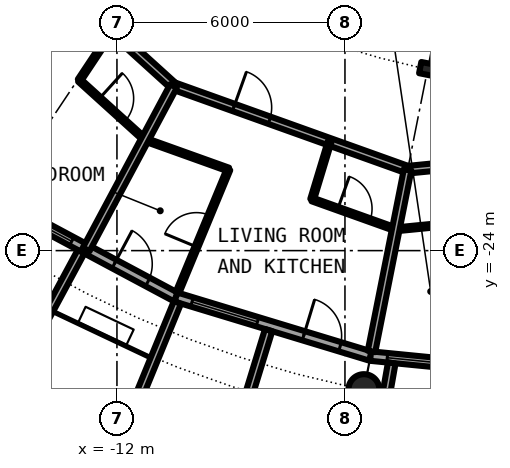
"""IFC4 building model, lengths in metres.
Left out: names, types, materials, properties, quantities, classifications, styles, units other than length and angle.
Written with IfcOpenShell. Run it as: python <this file> out.ifc"""

import sys

from ifc_helpers import new_model, si_unit, direction, frame, frame_2d, origin, origin_2d, place, context, subcontext, project, spatial, rectangle, hollow_circle, i_section, extrude, element, fill, save


model = new_model("IFC4")
c1 = context("Model", 3, precision=1e-05, world=origin(), true_north=direction((0.0, 1.0)))
c2 = subcontext(c1, "Body", "Model", "MODEL_VIEW")
j1 = project(units=[si_unit("LENGTHUNIT", "METRE"), si_unit("PLANEANGLEUNIT", "RADIAN")], contexts=[c1])
p1 = place(None, origin())
s1 = spatial("IfcSite", under=j1, at=p1, CompositionType="ELEMENT")
p2 = place(p1, origin())
s2 = spatial("IfcBuilding", under=s1, at=p2, CompositionType="ELEMENT")
p3 = place(p2, frame((0.0, 0.0, 202.4)))
s3 = spatial("IfcBuildingStorey", under=s2, at=p3, CompositionType="ELEMENT", Elevation=202.4)
p4 = place(p3, frame((-5.501, -27.658, 0.0), z_axis=(0.0, 0.0, 1.0), x_axis=(1.0, 0.0, 0.0)))
e1 = element("IfcColumn", 1, at=p4, inside=s3, PredefinedType="COLUMN", context=c2, shape_type="SweptSolid", body=[
    extrude(hollow_circle(Radius=0.406, WallThickness=0.03, at=origin_2d()), origin(), (0.0, 0.0, 1.0), 3.05),
])
p5 = place(p3, frame((-3.824, -19.223, 0.0), z_axis=(0.0, 0.0, 1.0), x_axis=(-0.195090322016, -0.980785280403, 0.0)))
e2 = element("IfcColumn", 2, at=p5, inside=s3, PredefinedType="COLUMN", context=c2, shape_type="SweptSolid", body=[
    extrude(i_section(OverallWidth=0.3, OverallDepth=0.4, WebThickness=0.013, FlangeThickness=0.024, FilletRadius=0.027, at=origin_2d()), origin(), (0.0, 0.0, 1.0), 3.05),
])
p6 = place(p3, frame((-15.167, -22.699, 0.0), z_axis=(0.0, 0.0, 1.0), x_axis=(0.881915646801, -0.471407246368, 0.0)))
e3 = element("IfcWall", 3, at=p6, inside=s3, PredefinedType="SOLIDWALL", context=c2, shape_type="SweptSolid", body=[
    extrude(rectangle(XDim=5.352, YDim=0.25, at=frame_2d((2.676, 0.0))), origin(), (0.0, 0.0, 1.0), 2.7),
])
p7 = place(p6, frame((0.441, 0.0, 0.3)))
e4 = element("IfcOpeningElement", 4, at=p7, cuts=e3, PredefinedType="OPENING", context=c2, shape_type="SweptSolid", body=[
    extrude(rectangle(XDim=1.8, YDim=2.1, at=frame_2d((0.9, 1.05))), frame((0.0, 0.135, 0.0), z_axis=(0.0, -1.0, 0.0), x_axis=(1.0, 0.0, 0.0)), (0.0, 0.0, 1.0), 0.27),
])
p8 = place(p6, frame((3.51, 0.0, 0.0)))
e5 = element("IfcOpeningElement", 5, at=p8, cuts=e3, PredefinedType="OPENING", context=c2, shape_type="SweptSolid", body=[
    extrude(rectangle(XDim=1.0, YDim=2.2, at=frame_2d((0.5, 1.1))), frame((0.0, 0.135, 0.0), z_axis=(0.0, -1.0, 0.0), x_axis=(1.0, 0.0, 0.0)), (0.0, 0.0, 1.0), 0.27),
])
p9 = place(p3, frame((-12.945, -24.029, -0.03), z_axis=(0.0, 0.0, 1.0), x_axis=(-0.474424310775, -0.88029629861, 0.0)))
e6 = element("IfcWall", 6, at=p9, inside=s3, PredefinedType="SOLIDWALL", context=c2, shape_type="SweptSolid", body=[
    extrude(rectangle(XDim=3.006, YDim=0.2, at=frame_2d((1.503, 0.0))), origin(), (0.0, 0.0, 1.0), 2.73),
])
p10 = place(p3, frame((-10.447, -25.222, 0.0), z_axis=(0.0, 0.0, 1.0), x_axis=(0.956965678721, -0.290201119486, 0.0)))
e7 = element("IfcWall", 7, at=p10, inside=s3, PredefinedType="SOLIDWALL", context=c2, shape_type="SweptSolid", body=[
    extrude(rectangle(XDim=5.351, YDim=0.25, at=frame_2d((2.676, 0.0))), origin(), (0.0, 0.0, 1.0), 2.7),
])
p11 = place(p10, frame((0.441, 0.0, 0.3)))
e8 = element("IfcOpeningElement", 8, at=p11, cuts=e7, PredefinedType="OPENING", context=c2, shape_type="SweptSolid", body=[
    extrude(rectangle(XDim=1.8, YDim=2.1, at=frame_2d((0.9, 1.05))), frame((0.0, 0.135, 0.0), z_axis=(0.0, -1.0, 0.0), x_axis=(1.0, 0.0, 0.0)), (0.0, 0.0, 1.0), 0.27),
])
p12 = place(p10, frame((3.51, 0.0, 0.0)))
e9 = element("IfcOpeningElement", 9, at=p12, cuts=e7, PredefinedType="OPENING", context=c2, shape_type="SweptSolid", body=[
    extrude(rectangle(XDim=1.0, YDim=2.2, at=frame_2d((0.5, 1.1))), frame((0.0, 0.135, 0.0), z_axis=(0.0, -1.0, 0.0), x_axis=(1.0, 0.0, 0.0)), (0.0, 0.0, 1.0), 0.27),
])
p13 = place(p3, frame((-10.409, -25.364, -0.03), z_axis=(0.0, 0.0, 1.0), x_axis=(-0.379509886562, -0.925187681501, 0.0)))
e10 = element("IfcWall", 10, at=p13, inside=s3, PredefinedType="SOLIDWALL", context=c2, shape_type="SweptSolid", body=[
    extrude(rectangle(XDim=2.883, YDim=0.2, at=frame_2d((1.441, 0.0))), origin(), (0.0, 0.0, 1.0), 2.73),
])
p14 = place(p3, frame((-8.009, -26.092, -0.03), z_axis=(0.0, 0.0, 1.0), x_axis=(-0.293406695073, -0.955987715029, 0.0)))
e11 = element("IfcWall", 11, at=p14, inside=s3, PredefinedType="SOLIDWALL", context=c2, shape_type="SweptSolid", body=[
    extrude(rectangle(XDim=3.006, YDim=0.2, at=frame_2d((1.503, 0.0))), origin(), (0.0, 0.0, 1.0), 2.73),
])
p15 = place(p3, frame((-5.326, -26.775, 0.0), z_axis=(0.0, 0.0, 1.0), x_axis=(0.995173996315, -0.098126026407, 0.0)))
e12 = element("IfcWall", 12, at=p15, inside=s3, PredefinedType="SOLIDWALL", context=c2, shape_type="SweptSolid", body=[
    extrude(rectangle(XDim=5.352, YDim=0.25, at=frame_2d((2.676, 0.0))), origin(), (0.0, 0.0, 1.0), 2.7),
])
p16 = place(p15, frame((0.441, 0.0, 0.3)))
e13 = element("IfcOpeningElement", 13, at=p16, cuts=e12, PredefinedType="OPENING", context=c2, shape_type="SweptSolid", body=[
    extrude(rectangle(XDim=1.8, YDim=2.1, at=frame_2d((0.9, 1.05))), frame((0.0, 0.135, 0.0), z_axis=(0.0, -1.0, 0.0), x_axis=(1.0, 0.0, 0.0)), (0.0, 0.0, 1.0), 0.27),
])
p17 = place(p15, frame((3.51, 0.0, 0.0)))
e14 = element("IfcOpeningElement", 14, at=p17, cuts=e12, PredefinedType="OPENING", context=c2, shape_type="SweptSolid", body=[
    extrude(rectangle(XDim=1.0, YDim=2.2, at=frame_2d((0.5, 1.1))), frame((0.0, 0.135, 0.0), z_axis=(0.0, -1.0, 0.0), x_axis=(1.0, 0.0, 0.0)), (0.0, 0.0, 1.0), 0.27),
])
p18 = place(p3, frame((-4.769, -26.956, -0.03), z_axis=(0.0, 0.0, 1.0), x_axis=(-0.174056778901, -0.984735618183, 0.0)))
e15 = element("IfcWall", 15, at=p18, inside=s3, PredefinedType="SOLIDWALL", context=c2, shape_type="SweptSolid", body=[
    extrude(rectangle(XDim=2.925, YDim=0.2, at=frame_2d((1.462, 0.0))), origin(), (0.0, 0.0, 1.0), 2.73),
])
p19 = place(p3, frame((-11.266, -21.078, 0.0), z_axis=(0.0, 0.0, 1.0), x_axis=(0.941477019106, -0.337077175873, 0.0)))
e16 = element("IfcWall", 16, at=p19, inside=s3, PredefinedType="PARTITIONING", context=c2, shape_type="SweptSolid", body=[
    extrude(rectangle(XDim=2.338, YDim=0.1, at=frame_2d((1.169, 0.0))), origin(), (0.0, 0.0, 1.0), 2.7),
])
p20 = place(p3, frame((-6.864, -22.654, 0.0), z_axis=(0.0, 0.0, 1.0), x_axis=(0.941498294089, -0.337017747646, 0.0)))
e17 = element("IfcWall", 17, at=p20, inside=s3, PredefinedType="PARTITIONING", context=c2, shape_type="SweptSolid", body=[
    extrude(rectangle(XDim=2.338, YDim=0.1, at=frame_2d((1.169, 0.0))), origin(), (0.0, 0.0, 1.0), 2.7),
])
p21 = place(p20, frame((0.719, 0.0, 0.0)))
e18 = element("IfcOpeningElement", 18, at=p21, cuts=e17, PredefinedType="OPENING", context=c2, shape_type="SweptSolid", body=[
    extrude(rectangle(XDim=0.9, YDim=2.3, at=frame_2d((0.45, 1.15))), frame((0.0, 0.06, 0.0), z_axis=(0.0, -1.0, 0.0), x_axis=(1.0, 0.0, 0.0)), (0.0, 0.0, 1.0), 0.12),
])
p22 = place(p3, frame((-12.988, -19.518, 0.0), z_axis=(0.0, 0.0, 1.0), x_axis=(0.741132356378, -0.671358942988, 0.0)))
e19 = element("IfcWall", 19, at=p22, inside=s3, PredefinedType="PARTITIONING", context=c2, shape_type="SweptSolid", body=[
    extrude(rectangle(XDim=2.323, YDim=0.1, at=frame_2d((1.162, 0.0))), origin(), (0.0, 0.0, 1.0), 2.7),
])
p23 = place(p22, frame((0.712, 0.0, 0.0)))
e20 = element("IfcOpeningElement", 20, at=p23, cuts=e19, PredefinedType="OPENING", context=c2, shape_type="SweptSolid", body=[
    extrude(rectangle(XDim=0.9, YDim=2.3, at=frame_2d((0.45, 1.15))), frame((0.0, 0.06, 0.0), z_axis=(0.0, -1.0, 0.0), x_axis=(1.0, 0.0, 0.0)), (0.0, 0.0, 1.0), 0.12),
])
p24 = place(p3, frame((-4.667, -23.441, 0.0), z_axis=(0.0, 0.0, 1.0), x_axis=(0.995185674562, 0.098007515761, 0.0)))
e21 = element("IfcWall", 21, at=p24, inside=s3, PredefinedType="PARTITIONING", context=c2, shape_type="SweptSolid", body=[
    extrude(rectangle(XDim=6.948, YDim=0.1, at=frame_2d((3.474, 0.0))), origin(), (0.0, 0.0, 1.0), 2.7),
])
p25 = place(p24, frame((3.021, 0.0, 0.0)))
e22 = element("IfcOpeningElement", 22, at=p25, cuts=e21, PredefinedType="OPENING", context=c2, shape_type="SweptSolid", body=[
    extrude(rectangle(XDim=0.9, YDim=2.3, at=frame_2d((0.45, 1.15))), frame((0.0, 0.06, 0.0), z_axis=(0.0, -1.0, 0.0), x_axis=(1.0, 0.0, 0.0)), (0.0, 0.0, 1.0), 0.12),
])
p26 = place(p3, frame((-10.512, -19.667, 0.0), z_axis=(0.0, 0.0, 1.0), x_axis=(0.941518972512, -0.336959974478, 0.0)))
e23 = element("IfcWall", 23, at=p26, inside=s3, PredefinedType="PARTITIONING", context=c2, shape_type="SweptSolid", body=[
    extrude(rectangle(XDim=6.547, YDim=0.2, at=frame_2d((3.273, 0.0))), origin(), (0.0, 0.0, 1.0), 2.7),
])
p27 = place(p26, frame((1.682, 0.0, 0.0)))
e24 = element("IfcOpeningElement", 24, at=p27, cuts=e23, PredefinedType="OPENING", context=c2, shape_type="SweptSolid", body=[
    extrude(rectangle(XDim=1.0, YDim=2.3, at=frame_2d((0.5, 1.15))), frame((0.0, 0.11, 0.0), z_axis=(0.0, -1.0, 0.0), x_axis=(1.0, 0.0, 0.0)), (0.0, 0.0, 1.0), 0.22),
])
p28 = place(p3, frame((-18.542, -12.389, 0.0), z_axis=(0.0, 0.0, 1.0), x_axis=(0.74093897184, -0.671572363941, 0.0)))
e25 = element("IfcWall", 25, at=p28, inside=s3, PredefinedType="PARTITIONING", context=c2, shape_type="SweptSolid", body=[
    extrude(rectangle(XDim=10.84, YDim=0.2, at=frame_2d((5.42, 0.0))), origin(), (0.0, 0.0, 1.0), 2.7),
])
p29 = place(p28, frame((6.544, 0.0, 0.0)))
e26 = element("IfcOpeningElement", 26, at=p29, cuts=e25, PredefinedType="OPENING", context=c2, shape_type="SweptSolid", body=[
    extrude(rectangle(XDim=1.0, YDim=2.3, at=frame_2d((0.5, 1.15))), frame((0.0, 0.11, 0.0), z_axis=(0.0, -1.0, 0.0), x_axis=(1.0, 0.0, 0.0)), (0.0, 0.0, 1.0), 0.22),
])
p30 = place(p3, frame((-4.355, -21.872, 0.0), z_axis=(0.0, 0.0, 1.0), x_axis=(0.995184945277, 0.098014920772, 0.0)))
e27 = element("IfcWall", 27, at=p30, inside=s3, PredefinedType="PARTITIONING", context=c2, shape_type="SweptSolid", body=[
    extrude(rectangle(XDim=12.958, YDim=0.2, at=frame_2d((6.479, 0.0))), origin(), (0.0, 0.0, 1.0), 2.7),
])
p31 = place(p30, frame((5.978, 0.0, 0.0)))
e28 = element("IfcOpeningElement", 28, at=p31, cuts=e27, PredefinedType="OPENING", context=c2, shape_type="SweptSolid", body=[
    extrude(rectangle(XDim=1.0, YDim=2.3, at=frame_2d((0.5, 1.15))), frame((0.0, 0.11, 0.0), z_axis=(0.0, -1.0, 0.0), x_axis=(1.0, 0.0, 0.0)), (0.0, 0.0, 1.0), 0.22),
])
p32 = place(p3, frame((-6.864, -22.653, 0.0), z_axis=(0.0, 0.0, 1.0), x_axis=(0.290315311421, 0.956931042424, 0.0)))
e29 = element("IfcWall", 29, at=p32, inside=s3, PredefinedType="PARTITIONING", context=c2, shape_type="SweptSolid", body=[
    extrude(rectangle(XDim=1.584, YDim=0.1, at=frame_2d((0.792, 0.0))), origin(), (0.0, 0.0, 1.0), 2.7),
])
p33 = place(p3, frame((-12.988, -19.518, 0.0), z_axis=(0.0, 0.0, 1.0), x_axis=(0.554125989098, 0.832432813028, 0.0)))
e30 = element("IfcWall", 30, at=p33, inside=s3, PredefinedType="PARTITIONING", context=c2, shape_type="SweptSolid", body=[
    extrude(rectangle(XDim=1.57, YDim=0.1, at=frame_2d((0.785, 0.0))), origin(), (0.0, 0.0, 1.0), 2.7),
])
p34 = place(p3, frame((-12.809, -23.967, 0.0), z_axis=(0.0, 0.0, 1.0), x_axis=(0.471427642527, 0.881904744211, 0.0)))
e31 = element("IfcWall", 31, at=p34, inside=s3, PredefinedType="PARTITIONING", context=c2, shape_type="SweptSolid", body=[
    extrude(rectangle(XDim=4.875, YDim=0.2, at=frame_2d((2.438, 0.0))), origin(), (0.0, 0.0, 1.0), 2.7),
])
p35 = place(p3, frame((-10.407, -25.103, 0.0), z_axis=(0.0, 0.0, 1.0), x_axis=(0.382977322646, 0.9237577444, 0.0)))
e32 = element("IfcWall", 32, at=p35, inside=s3, PredefinedType="PARTITIONING", context=c2, shape_type="SweptSolid", body=[
    extrude(rectangle(XDim=3.504, YDim=0.1, at=frame_2d((1.752, 0.0))), origin(), (0.0, 0.0, 1.0), 2.7),
])
p36 = place(p35, frame((1.302, 0.0, 0.0)))
e33 = element("IfcOpeningElement", 33, at=p36, cuts=e32, PredefinedType="OPENING", context=c2, shape_type="SweptSolid", body=[
    extrude(rectangle(XDim=0.9, YDim=2.3, at=frame_2d((0.45, 1.15))), frame((0.0, 0.06, 0.0), z_axis=(0.0, -1.0, 0.0), x_axis=(1.0, 0.0, 0.0)), (0.0, 0.0, 1.0), 0.12),
])
p37 = place(p3, frame((-5.302, -26.653, 0.0), z_axis=(0.0, 0.0, 1.0), x_axis=(0.195075825861, 0.980788163756, 0.0)))
e34 = element("IfcWall", 34, at=p37, inside=s3, PredefinedType="PARTITIONING", context=c2, shape_type="SweptSolid", body=[
    extrude(rectangle(XDim=4.875, YDim=0.2, at=frame_2d((2.438, 0.0))), origin(), (0.0, 0.0, 1.0), 2.7),
])
p38 = place(p7, origin())
e35 = element("IfcWindow", 35, at=p38, inside=s3, PartitioningType="SINGLE_PANEL", PredefinedType="WINDOW", context=c2, shape_type="SweptSolid", body=[
    extrude(rectangle(XDim=1.8, YDim=2.1, at=frame_2d((0.9, 1.05))), frame((0.0, 0.03, 0.0), z_axis=(0.0, -1.0, 0.0), x_axis=(1.0, 0.0, 0.0)), (0.0, 0.0, 1.0), 0.06),
])
fill(e4, e35)
p39 = place(p8, origin())
e36 = element("IfcDoor", 36, at=p39, inside=s3, OperationType="SINGLE_SWING_LEFT", PredefinedType="DOOR", context=c2, shape_type="SweptSolid", body=[
    extrude(rectangle(XDim=1.0, YDim=2.2, at=frame_2d((0.5, 1.1))), frame((0.0, 0.025, 0.0), z_axis=(0.0, -1.0, 0.0), x_axis=(1.0, 0.0, 0.0)), (0.0, 0.0, 1.0), 0.05),
])
fill(e5, e36)
p40 = place(p11, origin())
e37 = element("IfcWindow", 37, at=p40, inside=s3, PartitioningType="SINGLE_PANEL", PredefinedType="WINDOW", context=c2, shape_type="SweptSolid", body=[
    extrude(rectangle(XDim=1.8, YDim=2.1, at=frame_2d((0.9, 1.05))), frame((0.0, 0.03, 0.0), z_axis=(0.0, -1.0, 0.0), x_axis=(1.0, 0.0, 0.0)), (0.0, 0.0, 1.0), 0.06),
])
fill(e8, e37)
p41 = place(p12, origin())
e38 = element("IfcDoor", 38, at=p41, inside=s3, OperationType="SINGLE_SWING_LEFT", PredefinedType="DOOR", context=c2, shape_type="SweptSolid", body=[
    extrude(rectangle(XDim=1.0, YDim=2.2, at=frame_2d((0.5, 1.1))), frame((0.0, 0.025, 0.0), z_axis=(0.0, -1.0, 0.0), x_axis=(1.0, 0.0, 0.0)), (0.0, 0.0, 1.0), 0.05),
])
fill(e9, e38)
p42 = place(p16, origin())
e39 = element("IfcWindow", 39, at=p42, inside=s3, PartitioningType="SINGLE_PANEL", PredefinedType="WINDOW", context=c2, shape_type="SweptSolid", body=[
    extrude(rectangle(XDim=1.8, YDim=2.1, at=frame_2d((0.9, 1.05))), frame((0.0, 0.03, 0.0), z_axis=(0.0, -1.0, 0.0), x_axis=(1.0, 0.0, 0.0)), (0.0, 0.0, 1.0), 0.06),
])
fill(e13, e39)
p43 = place(p23, origin())
e40 = element("IfcDoor", 40, at=p43, inside=s3, OperationType="SINGLE_SWING_RIGHT", PredefinedType="DOOR", context=c2, shape_type="SweptSolid", body=[
    extrude(rectangle(XDim=0.9, YDim=2.3, at=frame_2d((0.45, 1.15))), frame((0.0, 0.025, 0.0), z_axis=(0.0, -1.0, 0.0), x_axis=(1.0, 0.0, 0.0)), (0.0, 0.0, 1.0), 0.05),
])
fill(e20, e40)
p44 = place(p27, origin())
e41 = element("IfcDoor", 41, at=p44, inside=s3, OperationType="SINGLE_SWING_LEFT", PredefinedType="DOOR", context=c2, shape_type="SweptSolid", body=[
    extrude(rectangle(XDim=1.0, YDim=2.3, at=frame_2d((0.5, 1.15))), frame((0.0, 0.025, 0.0), z_axis=(0.0, -1.0, 0.0), x_axis=(1.0, 0.0, 0.0)), (0.0, 0.0, 1.0), 0.05),
])
fill(e24, e41)
p45 = place(p21, origin())
e42 = element("IfcDoor", 42, at=p45, inside=s3, OperationType="SINGLE_SWING_LEFT", PredefinedType="DOOR", context=c2, shape_type="SweptSolid", body=[
    extrude(rectangle(XDim=0.9, YDim=2.3, at=frame_2d((0.45, 1.15))), frame((0.0, 0.025, 0.0), z_axis=(0.0, -1.0, 0.0), x_axis=(1.0, 0.0, 0.0)), (0.0, 0.0, 1.0), 0.05),
])
fill(e18, e42)
p46 = place(p36, origin())
e43 = element("IfcDoor", 43, at=p46, inside=s3, OperationType="SINGLE_SWING_LEFT", PredefinedType="DOOR", context=c2, shape_type="SweptSolid", body=[
    extrude(rectangle(XDim=0.9, YDim=2.3, at=frame_2d((0.45, 1.15))), frame((0.0, 0.025, 0.0), z_axis=(0.0, -1.0, 0.0), x_axis=(1.0, 0.0, 0.0)), (0.0, 0.0, 1.0), 0.05),
])
fill(e33, e43)
save(model, sys.argv[1])
